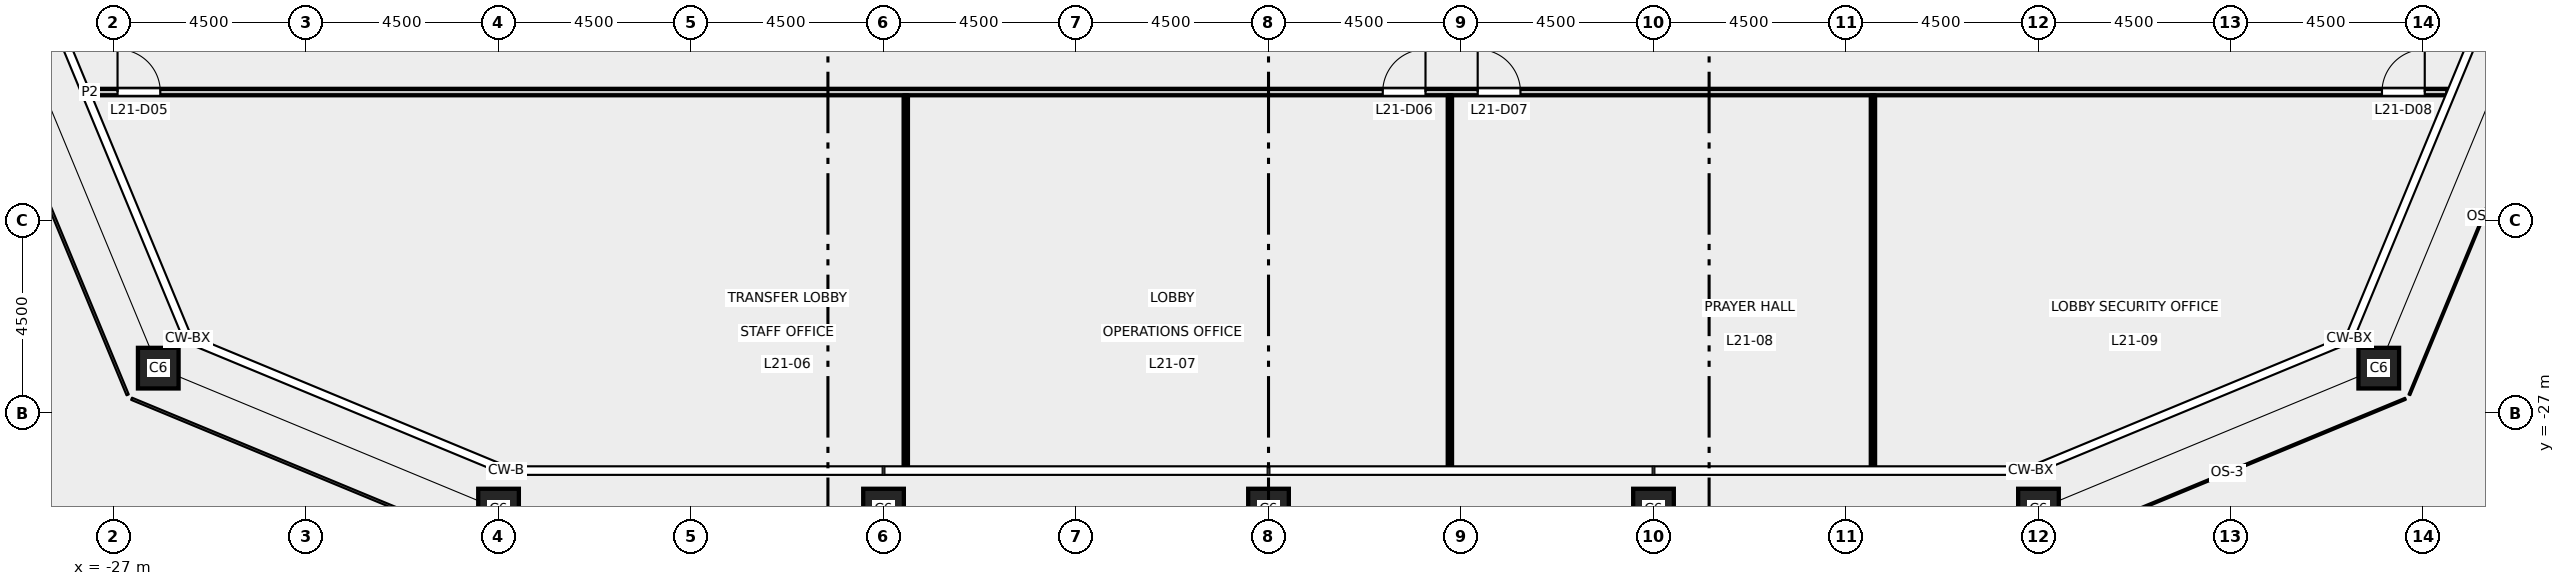
"""IFC4 building model, lengths in metres.
Left out: names, types, materials, properties, quantities, classifications, styles, units other than length and angle.
Written with IfcOpenShell. Run it as: python <this file> out.ifc"""

import sys

from ifc_helpers import new_model, si_unit, direction, frame, frame_2d, origin, origin_2d, place, context, subcontext, project, spatial, rectangle, hollow_rectangle, extrude, element, fill, save


model = new_model("IFC4")
c1 = context("Model", 3, precision=1e-05, world=origin(), true_north=direction((0.0, 1.0)))
c2 = subcontext(c1, "Body", "Model", "MODEL_VIEW")
j1 = project(units=[si_unit("LENGTHUNIT", "METRE"), si_unit("PLANEANGLEUNIT", "RADIAN")], contexts=[c1])
p1 = place(None, origin())
s1 = spatial("IfcSite", under=j1, at=p1, CompositionType="ELEMENT")
p2 = place(p1, origin())
s2 = spatial("IfcBuilding", under=s1, at=p2, CompositionType="ELEMENT")
p3 = place(p2, frame((0.0, 0.0, 99.2)))
s3 = spatial("IfcBuildingStorey", under=s2, at=p3, CompositionType="ELEMENT", Elevation=99.2)
for number, where, z_axis, x_axis in (
    (1, (-18.0, -29.25, -0.2), (0.0, 0.0, 1.0), (1.0, 0.0, 0.0)),
    (2, (-9.0, -29.25, -0.2), (0.0, 0.0, 1.0), (1.0, 0.0, 0.0)),
    (3, (0.0, -29.25, -0.2), (0.0, 0.0, 1.0), (1.0, 0.0, 0.0)),
    (4, (9.0, -29.25, -0.2), (0.0, 0.0, 1.0), (1.0, 0.0, 0.0)),
    (5, (18.0, -29.25, -0.2), (0.0, 0.0, 1.0), (1.0, 0.0, 0.0)),
    (6, (25.955, -25.955, -0.2), (0.0, 0.0, 1.0), (1.0, 0.0, 0.0)),
    (7, (-25.955, -25.955, -0.2), (0.0, 0.0, 1.0), (1.0, 0.0, 0.0)),
):
    element("IfcColumn", number, at=place(p3, frame(where, z_axis=z_axis, x_axis=x_axis)), inside=s3, PredefinedType="COLUMN", context=c2, shape_type="SweptSolid", body=[
        extrude(hollow_rectangle(XDim=0.95, YDim=0.95, WallThickness=0.055, at=origin_2d()), origin(), (0.0, 0.0, 1.0), 5.7),
    ])
p4 = place(p3, frame((-27.557, -19.5, 0.0), z_axis=(0.0, 0.0, 1.0), x_axis=(1.0, 0.0, 0.0)))
e8 = element("IfcWall", 8, at=p4, inside=s3, PredefinedType="PARTITIONING", context=c2, shape_type="SweptSolid", body=[
    extrude(rectangle(XDim=55.114, YDim=0.15, at=frame_2d((27.557, 0.0))), origin(), (0.0, 0.0, 1.0), 4.9),
])
p5 = place(p4, frame((0.65, 0.0, 0.0)))
e9 = element("IfcOpeningElement", 9, at=p5, cuts=e8, PredefinedType="OPENING", context=c2, shape_type="SweptSolid", body=[
    extrude(rectangle(XDim=1.0, YDim=2.1, at=frame_2d((0.5, 1.05))), frame((0.0, 0.085, 0.0), z_axis=(0.0, -1.0, 0.0), x_axis=(1.0, 0.0, 0.0)), (0.0, 0.0, 1.0), 0.17),
])
p6 = place(p4, frame((30.227, 0.0, 0.0)))
e10 = element("IfcOpeningElement", 10, at=p6, cuts=e8, PredefinedType="OPENING", context=c2, shape_type="SweptSolid", body=[
    extrude(rectangle(XDim=1.0, YDim=2.1, at=frame_2d((0.5, 1.05))), frame((0.0, 0.085, 0.0), z_axis=(0.0, -1.0, 0.0), x_axis=(1.0, 0.0, 0.0)), (0.0, 0.0, 1.0), 0.17),
])
p7 = place(p4, frame((32.447, 0.0, 0.0)))
e11 = element("IfcOpeningElement", 11, at=p7, cuts=e8, PredefinedType="OPENING", context=c2, shape_type="SweptSolid", body=[
    extrude(rectangle(XDim=1.0, YDim=2.1, at=frame_2d((0.5, 1.05))), frame((0.0, 0.085, 0.0), z_axis=(0.0, -1.0, 0.0), x_axis=(1.0, 0.0, 0.0)), (0.0, 0.0, 1.0), 0.17),
])
p8 = place(p4, frame((53.587, 0.0, 0.0)))
e12 = element("IfcOpeningElement", 12, at=p8, cuts=e8, PredefinedType="OPENING", context=c2, shape_type="SweptSolid", body=[
    extrude(rectangle(XDim=1.0, YDim=2.1, at=frame_2d((0.5, 1.05))), frame((0.0, 0.085, 0.0), z_axis=(0.0, -1.0, 0.0), x_axis=(1.0, 0.0, 0.0)), (0.0, 0.0, 1.0), 0.17),
])
for number, where, z_axis, x_axis in (
    (13, (-8.48, -28.26, 0.0), (0.0, 0.0, 1.0), (0.0, 1.0, 0.0)),
    (14, (4.24, -28.26, 0.0), (0.0, 0.0, 1.0), (0.0, 1.0, 0.0)),
    (15, (14.13, -28.26, 0.0), (0.0, 0.0, 1.0), (0.0, 1.0, 0.0)),
):
    element("IfcWall", number, at=place(p3, frame(where, z_axis=z_axis, x_axis=x_axis)), inside=s3, PredefinedType="PARTITIONING", context=c2, shape_type="SweptSolid", body=[
        extrude(rectangle(XDim=8.685, YDim=0.1, at=frame_2d((4.343, 0.0))), origin(), (0.0, 0.0, 1.0), 5.35),
    ])
p9 = place(p5, origin())
e16 = element("IfcDoor", 16, at=p9, inside=s3, OperationType="SINGLE_SWING_LEFT", PredefinedType="DOOR", context=c2, shape_type="SweptSolid", body=[
    extrude(rectangle(XDim=1.0, YDim=2.1, at=frame_2d((0.5, 1.05))), frame((0.0, 0.025, 0.0), z_axis=(0.0, -1.0, 0.0), x_axis=(1.0, 0.0, 0.0)), (0.0, 0.0, 1.0), 0.05),
])
fill(e9, e16)
p10 = place(p6, origin())
e17 = element("IfcDoor", 17, at=p10, inside=s3, OperationType="SINGLE_SWING_RIGHT", PredefinedType="DOOR", context=c2, shape_type="SweptSolid", body=[
    extrude(rectangle(XDim=1.0, YDim=2.1, at=frame_2d((0.5, 1.05))), frame((0.0, 0.025, 0.0), z_axis=(0.0, -1.0, 0.0), x_axis=(1.0, 0.0, 0.0)), (0.0, 0.0, 1.0), 0.05),
])
fill(e10, e17)
p11 = place(p7, origin())
e18 = element("IfcDoor", 18, at=p11, inside=s3, OperationType="SINGLE_SWING_LEFT", PredefinedType="DOOR", context=c2, shape_type="SweptSolid", body=[
    extrude(rectangle(XDim=1.0, YDim=2.1, at=frame_2d((0.5, 1.05))), frame((0.0, 0.025, 0.0), z_axis=(0.0, -1.0, 0.0), x_axis=(1.0, 0.0, 0.0)), (0.0, 0.0, 1.0), 0.05),
])
fill(e11, e18)
p12 = place(p8, origin())
e19 = element("IfcDoor", 19, at=p12, inside=s3, OperationType="SINGLE_SWING_RIGHT", PredefinedType="DOOR", context=c2, shape_type="SweptSolid", body=[
    extrude(rectangle(XDim=1.0, YDim=2.1, at=frame_2d((0.5, 1.05))), frame((0.0, 0.025, 0.0), z_axis=(0.0, -1.0, 0.0), x_axis=(1.0, 0.0, 0.0)), (0.0, 0.0, 1.0), 0.05),
])
fill(e12, e19)
save(model, sys.argv[1])
